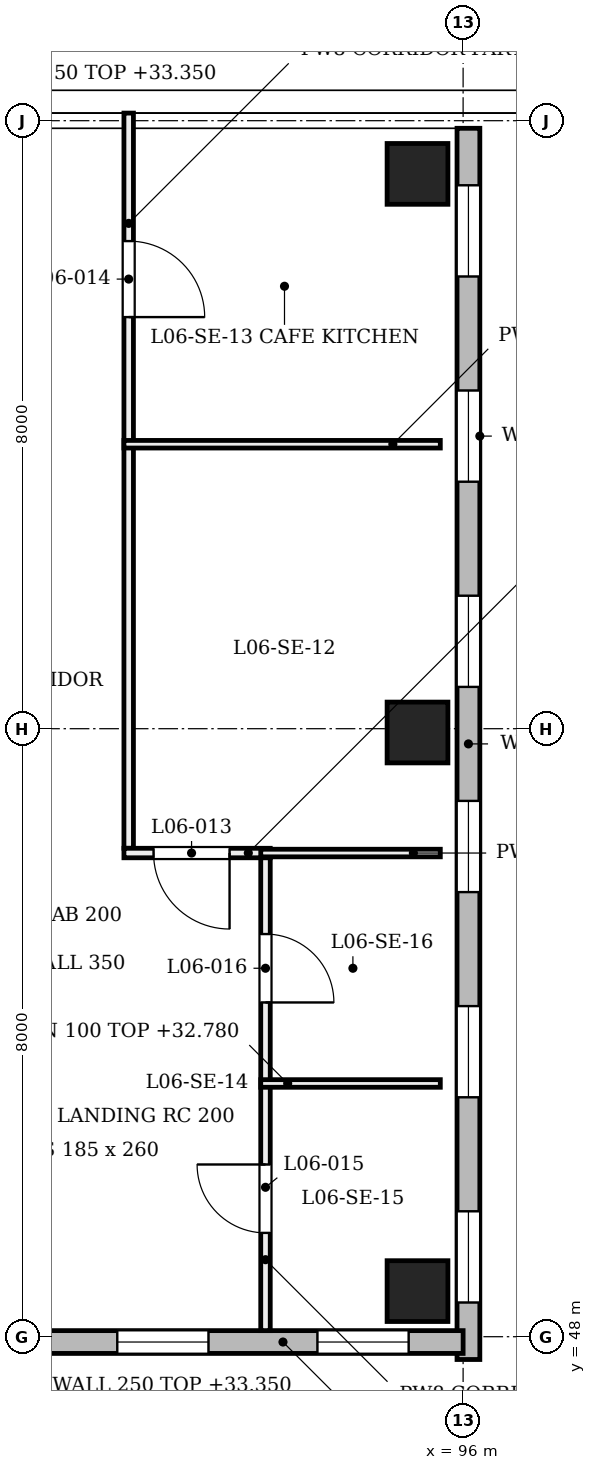
"""IFC4 building model, lengths in metres.
Left out: names, types, materials, properties, quantities, classifications, styles, units other than length and angle.
Written with IfcOpenShell. Run it as: python <this file> out.ifc"""

import sys

from ifc_helpers import new_model, si_unit, direction, frame, frame_2d, origin, origin_2d, place, context, subcontext, project, spatial, rectangle, extrude, element, fill, save


model = new_model("IFC4")
c1 = context("Model", 3, precision=1e-05, world=origin(), true_north=direction((0.0, 1.0)))
c2 = subcontext(c1, "Body", "Model", "MODEL_VIEW")
j1 = project(units=[si_unit("LENGTHUNIT", "METRE"), si_unit("PLANEANGLEUNIT", "RADIAN")], contexts=[c1])
p1 = place(None, origin())
s1 = spatial("IfcSite", under=j1, at=p1, CompositionType="ELEMENT")
p2 = place(p1, origin())
s2 = spatial("IfcBuilding", under=s1, at=p2, CompositionType="ELEMENT")
p3 = place(p2, frame((0.0, 0.0, 28.8)))
s3 = spatial("IfcBuildingStorey", under=s2, at=p3, CompositionType="ELEMENT", Elevation=28.8)
for number, where, z_axis, x_axis in (
    (1, (95.4, 48.6, 0.0), (0.0, 0.0, 1.0), (1.0, 0.0, 0.0)),
    (2, (95.4, 55.95, 0.0), (0.0, 0.0, 1.0), (1.0, 0.0, 0.0)),
    (3, (95.4, 63.3, 0.0), (0.0, 0.0, 1.0), (1.0, 0.0, 0.0)),
):
    element("IfcColumn", number, at=place(p3, frame(where, z_axis=z_axis, x_axis=x_axis)), inside=s3, PredefinedType="COLUMN", context=c2, shape_type="SweptSolid", body=[
        extrude(rectangle(XDim=0.8, YDim=0.8, at=origin_2d()), origin(), (0.0, 0.0, 1.0), 4.58),
    ])
p4 = place(p3, frame((96.07, 47.7, 0.0), z_axis=(0.0, 0.0, 1.0), x_axis=(0.0, 1.0, 0.0)))
e4 = element("IfcWall", 4, at=p4, inside=s3, PredefinedType="SOLIDWALL", context=c2, shape_type="SweptSolid", body=[
    extrude(rectangle(XDim=16.2, YDim=0.3, at=frame_2d((8.1, 0.0))), origin(), (0.0, 0.0, 1.0), 3.9),
])
p5 = place(p4, frame((0.75, 0.0, 1.0)))
e5 = element("IfcOpeningElement", 5, at=p5, cuts=e4, PredefinedType="OPENING", context=c2, shape_type="SweptSolid", body=[
    extrude(rectangle(XDim=1.2, YDim=2.4, at=frame_2d((0.6, 1.2))), frame((0.0, 0.16, 0.0), z_axis=(0.0, -1.0, 0.0), x_axis=(1.0, 0.0, 0.0)), (0.0, 0.0, 1.0), 0.32),
])
p6 = place(p4, frame((3.45, 0.0, 1.0)))
e6 = element("IfcOpeningElement", 6, at=p6, cuts=e4, PredefinedType="OPENING", context=c2, shape_type="SweptSolid", body=[
    extrude(rectangle(XDim=1.2, YDim=2.4, at=frame_2d((0.6, 1.2))), frame((0.0, 0.16, 0.0), z_axis=(0.0, -1.0, 0.0), x_axis=(1.0, 0.0, 0.0)), (0.0, 0.0, 1.0), 0.32),
])
p7 = place(p4, frame((6.15, 0.0, 1.0)))
e7 = element("IfcOpeningElement", 7, at=p7, cuts=e4, PredefinedType="OPENING", context=c2, shape_type="SweptSolid", body=[
    extrude(rectangle(XDim=1.2, YDim=2.4, at=frame_2d((0.6, 1.2))), frame((0.0, 0.16, 0.0), z_axis=(0.0, -1.0, 0.0), x_axis=(1.0, 0.0, 0.0)), (0.0, 0.0, 1.0), 0.32),
])
p8 = place(p4, frame((8.85, 0.0, 1.0)))
e8 = element("IfcOpeningElement", 8, at=p8, cuts=e4, PredefinedType="OPENING", context=c2, shape_type="SweptSolid", body=[
    extrude(rectangle(XDim=1.2, YDim=2.4, at=frame_2d((0.6, 1.2))), frame((0.0, 0.16, 0.0), z_axis=(0.0, -1.0, 0.0), x_axis=(1.0, 0.0, 0.0)), (0.0, 0.0, 1.0), 0.32),
])
p9 = place(p4, frame((11.55, 0.0, 1.0)))
e9 = element("IfcOpeningElement", 9, at=p9, cuts=e4, PredefinedType="OPENING", context=c2, shape_type="SweptSolid", body=[
    extrude(rectangle(XDim=1.2, YDim=2.4, at=frame_2d((0.6, 1.2))), frame((0.0, 0.16, 0.0), z_axis=(0.0, -1.0, 0.0), x_axis=(1.0, 0.0, 0.0)), (0.0, 0.0, 1.0), 0.32),
])
p10 = place(p4, frame((14.25, 0.0, 1.0)))
e10 = element("IfcOpeningElement", 10, at=p10, cuts=e4, PredefinedType="OPENING", context=c2, shape_type="SweptSolid", body=[
    extrude(rectangle(XDim=1.2, YDim=2.4, at=frame_2d((0.6, 1.2))), frame((0.0, 0.16, 0.0), z_axis=(0.0, -1.0, 0.0), x_axis=(1.0, 0.0, 0.0)), (0.0, 0.0, 1.0), 0.32),
])
p11 = place(p3, frame((88.1, 47.93, 0.0), z_axis=(0.0, 0.0, 1.0), x_axis=(1.0, 0.0, 0.0)))
e11 = element("IfcWall", 11, at=p11, inside=s3, PredefinedType="SOLIDWALL", context=c2, shape_type="SweptSolid", body=[
    extrude(rectangle(XDim=7.9, YDim=0.3, at=frame_2d((3.95, 0.0))), origin(), (0.0, 0.0, 1.0), 3.9),
])
p12 = place(p11, frame((0.717, 0.0, 1.0)))
e12 = element("IfcOpeningElement", 12, at=p12, cuts=e11, PredefinedType="OPENING", context=c2, shape_type="SweptSolid", body=[
    extrude(rectangle(XDim=1.2, YDim=2.4, at=frame_2d((0.6, 1.2))), frame((0.0, 0.16, 0.0), z_axis=(0.0, -1.0, 0.0), x_axis=(1.0, 0.0, 0.0)), (0.0, 0.0, 1.0), 0.32),
])
p13 = place(p11, frame((3.35, 0.0, 1.0)))
e13 = element("IfcOpeningElement", 13, at=p13, cuts=e11, PredefinedType="OPENING", context=c2, shape_type="SweptSolid", body=[
    extrude(rectangle(XDim=1.2, YDim=2.4, at=frame_2d((0.6, 1.2))), frame((0.0, 0.16, 0.0), z_axis=(0.0, -1.0, 0.0), x_axis=(1.0, 0.0, 0.0)), (0.0, 0.0, 1.0), 0.32),
])
p14 = place(p11, frame((5.983, 0.0, 1.0)))
e14 = element("IfcOpeningElement", 14, at=p14, cuts=e11, PredefinedType="OPENING", context=c2, shape_type="SweptSolid", body=[
    extrude(rectangle(XDim=1.2, YDim=2.4, at=frame_2d((0.6, 1.2))), frame((0.0, 0.16, 0.0), z_axis=(0.0, -1.0, 0.0), x_axis=(1.0, 0.0, 0.0)), (0.0, 0.0, 1.0), 0.32),
])
p15 = place(p3, frame((85.3, 64.25, 0.0), z_axis=(0.0, 0.0, 1.0), x_axis=(1.0, 0.0, 0.0)))
e15 = element("IfcWall", 15, at=p15, inside=s3, PredefinedType="PARAPET", context=c2, shape_type="SweptSolid", body=[
    extrude(rectangle(XDim=15.4, YDim=0.3, at=frame_2d((7.7, 0.0))), origin(), (0.0, 0.0, 1.0), 1.1),
])
p16 = place(p3, frame((91.6, 54.427, 0.0), z_axis=(0.0, 0.0, 1.0), x_axis=(0.0, 1.0, 0.0)))
e16 = element("IfcWall", 16, at=p16, inside=s3, PredefinedType="PARTITIONING", context=c2, shape_type="SweptSolid", body=[
    extrude(rectangle(XDim=9.674, YDim=0.125, at=frame_2d((4.837, 0.0))), origin(), (0.0, 0.0, 1.0), 3.88),
])
p17 = place(p16, frame((6.99, 0.0, 0.0)))
e17 = element("IfcOpeningElement", 17, at=p17, cuts=e16, PredefinedType="OPENING", context=c2, shape_type="SweptSolid", body=[
    extrude(rectangle(XDim=1.0, YDim=2.1, at=frame_2d((0.5, 1.05))), frame((0.0, 0.073, 0.0), z_axis=(0.0, -1.0, 0.0), x_axis=(1.0, 0.0, 0.0)), (0.0, 0.0, 1.0), 0.145),
])
p18 = place(p3, frame((91.538, 54.364, 0.0), z_axis=(0.0, 0.0, 1.0), x_axis=(1.0, 0.0, 0.0)))
e18 = element("IfcWall", 18, at=p18, inside=s3, PredefinedType="PARTITIONING", context=c2, shape_type="SweptSolid", body=[
    extrude(rectangle(XDim=1.925, YDim=0.125, at=frame_2d((0.962, 0.0))), origin(), (0.0, 0.0, 1.0), 4.56),
])
p19 = place(p18, frame((0.39, 0.0, 0.0)))
e19 = element("IfcOpeningElement", 19, at=p19, cuts=e18, PredefinedType="OPENING", context=c2, shape_type="SweptSolid", body=[
    extrude(rectangle(XDim=1.0, YDim=2.1, at=frame_2d((0.5, 1.05))), frame((0.0, 0.073, 0.0), z_axis=(0.0, -1.0, 0.0), x_axis=(1.0, 0.0, 0.0)), (0.0, 0.0, 1.0), 0.145),
])
p20 = place(p3, frame((93.337, 54.364, 0.0), z_axis=(0.0, 0.0, 1.0), x_axis=(1.0, 0.0, 0.0)))
e20 = element("IfcWall", 20, at=p20, inside=s3, PredefinedType="PARTITIONING", context=c2, shape_type="SweptSolid", body=[
    extrude(rectangle(XDim=2.363, YDim=0.1, at=frame_2d((1.181, 0.0))), origin(), (0.0, 0.0, 1.0), 3.98),
])
p21 = place(p3, frame((91.538, 59.743, 0.0), z_axis=(0.0, 0.0, 1.0), x_axis=(1.0, 0.0, 0.0)))
e21 = element("IfcWall", 21, at=p21, inside=s3, PredefinedType="PARTITIONING", context=c2, shape_type="SweptSolid", body=[
    extrude(rectangle(XDim=4.162, YDim=0.1, at=frame_2d((2.081, 0.0))), origin(), (0.0, 0.0, 1.0), 3.98),
])
p22 = place(p3, frame((93.4, 48.08, 0.0), z_axis=(0.0, 0.0, 1.0), x_axis=(0.0, 1.0, 0.0)))
e22 = element("IfcWall", 22, at=p22, inside=s3, PredefinedType="PARTITIONING", context=c2, shape_type="SweptSolid", body=[
    extrude(rectangle(XDim=6.221, YDim=0.125, at=frame_2d((3.111, 0.0))), origin(), (0.0, 0.0, 1.0), 3.88),
])
p23 = place(p22, frame((1.286, 0.0, 0.0)))
e23 = element("IfcOpeningElement", 23, at=p23, cuts=e22, PredefinedType="OPENING", context=c2, shape_type="SweptSolid", body=[
    extrude(rectangle(XDim=0.9, YDim=2.1, at=frame_2d((0.45, 1.05))), frame((0.0, 0.073, 0.0), z_axis=(0.0, -1.0, 0.0), x_axis=(1.0, 0.0, 0.0)), (0.0, 0.0, 1.0), 0.145),
])
p24 = place(p22, frame((4.318, 0.0, 0.0)))
e24 = element("IfcOpeningElement", 24, at=p24, cuts=e22, PredefinedType="OPENING", context=c2, shape_type="SweptSolid", body=[
    extrude(rectangle(XDim=0.9, YDim=2.1, at=frame_2d((0.45, 1.05))), frame((0.0, 0.073, 0.0), z_axis=(0.0, -1.0, 0.0), x_axis=(1.0, 0.0, 0.0)), (0.0, 0.0, 1.0), 0.145),
])
p25 = place(p3, frame((93.337, 51.332, 0.0), z_axis=(0.0, 0.0, 1.0), x_axis=(1.0, 0.0, 0.0)))
e25 = element("IfcWall", 25, at=p25, inside=s3, PredefinedType="PARTITIONING", context=c2, shape_type="SweptSolid", body=[
    extrude(rectangle(XDim=2.363, YDim=0.1, at=frame_2d((1.181, 0.0))), origin(), (0.0, 0.0, 1.0), 3.98),
])
p26 = place(p5, origin())
e26 = element("IfcWindow", 26, at=p26, inside=s3, PartitioningType="SINGLE_PANEL", PredefinedType="WINDOW", context=c2, shape_type="SweptSolid", body=[
    extrude(rectangle(XDim=1.2, YDim=2.4, at=frame_2d((0.6, 1.2))), frame((0.0, 0.03, 0.0), z_axis=(0.0, -1.0, 0.0), x_axis=(1.0, 0.0, 0.0)), (0.0, 0.0, 1.0), 0.06),
])
fill(e5, e26)
p27 = place(p6, origin())
e27 = element("IfcWindow", 27, at=p27, inside=s3, PartitioningType="SINGLE_PANEL", PredefinedType="WINDOW", context=c2, shape_type="SweptSolid", body=[
    extrude(rectangle(XDim=1.2, YDim=2.4, at=frame_2d((0.6, 1.2))), frame((0.0, 0.03, 0.0), z_axis=(0.0, -1.0, 0.0), x_axis=(1.0, 0.0, 0.0)), (0.0, 0.0, 1.0), 0.06),
])
fill(e6, e27)
p28 = place(p7, origin())
e28 = element("IfcWindow", 28, at=p28, inside=s3, PartitioningType="SINGLE_PANEL", PredefinedType="WINDOW", context=c2, shape_type="SweptSolid", body=[
    extrude(rectangle(XDim=1.2, YDim=2.4, at=frame_2d((0.6, 1.2))), frame((0.0, 0.03, 0.0), z_axis=(0.0, -1.0, 0.0), x_axis=(1.0, 0.0, 0.0)), (0.0, 0.0, 1.0), 0.06),
])
fill(e7, e28)
p29 = place(p8, origin())
e29 = element("IfcWindow", 29, at=p29, inside=s3, PartitioningType="SINGLE_PANEL", PredefinedType="WINDOW", context=c2, shape_type="SweptSolid", body=[
    extrude(rectangle(XDim=1.2, YDim=2.4, at=frame_2d((0.6, 1.2))), frame((0.0, 0.03, 0.0), z_axis=(0.0, -1.0, 0.0), x_axis=(1.0, 0.0, 0.0)), (0.0, 0.0, 1.0), 0.06),
])
fill(e8, e29)
p30 = place(p9, origin())
e30 = element("IfcWindow", 30, at=p30, inside=s3, PartitioningType="SINGLE_PANEL", PredefinedType="WINDOW", context=c2, shape_type="SweptSolid", body=[
    extrude(rectangle(XDim=1.2, YDim=2.4, at=frame_2d((0.6, 1.2))), frame((0.0, 0.03, 0.0), z_axis=(0.0, -1.0, 0.0), x_axis=(1.0, 0.0, 0.0)), (0.0, 0.0, 1.0), 0.06),
])
fill(e9, e30)
p31 = place(p10, origin())
e31 = element("IfcWindow", 31, at=p31, inside=s3, PartitioningType="SINGLE_PANEL", PredefinedType="WINDOW", context=c2, shape_type="SweptSolid", body=[
    extrude(rectangle(XDim=1.2, YDim=2.4, at=frame_2d((0.6, 1.2))), frame((0.0, 0.03, 0.0), z_axis=(0.0, -1.0, 0.0), x_axis=(1.0, 0.0, 0.0)), (0.0, 0.0, 1.0), 0.06),
])
fill(e10, e31)
p32 = place(p13, origin())
e32 = element("IfcWindow", 32, at=p32, inside=s3, PartitioningType="SINGLE_PANEL", PredefinedType="WINDOW", context=c2, shape_type="SweptSolid", body=[
    extrude(rectangle(XDim=1.2, YDim=2.4, at=frame_2d((0.6, 1.2))), frame((0.0, 0.03, 0.0), z_axis=(0.0, -1.0, 0.0), x_axis=(1.0, 0.0, 0.0)), (0.0, 0.0, 1.0), 0.06),
])
fill(e13, e32)
p33 = place(p14, origin())
e33 = element("IfcWindow", 33, at=p33, inside=s3, PartitioningType="SINGLE_PANEL", PredefinedType="WINDOW", context=c2, shape_type="SweptSolid", body=[
    extrude(rectangle(XDim=1.2, YDim=2.4, at=frame_2d((0.6, 1.2))), frame((0.0, 0.03, 0.0), z_axis=(0.0, -1.0, 0.0), x_axis=(1.0, 0.0, 0.0)), (0.0, 0.0, 1.0), 0.06),
])
fill(e14, e33)
p34 = place(p19, origin())
e34 = element("IfcDoor", 34, at=p34, inside=s3, OperationType="SINGLE_SWING_RIGHT", PredefinedType="DOOR", context=c2, shape_type="SweptSolid", body=[
    extrude(rectangle(XDim=1.0, YDim=2.1, at=frame_2d((0.5, 1.05))), frame((0.0, 0.025, 0.0), z_axis=(0.0, -1.0, 0.0), x_axis=(1.0, 0.0, 0.0)), (0.0, 0.0, 1.0), 0.05),
])
fill(e19, e34)
p35 = place(p17, frame((1.0, 0.0, 0.0), z_axis=(0.0, 0.0, 1.0), x_axis=(-1.0, 0.0, 0.0)))
e35 = element("IfcDoor", 35, at=p35, inside=s3, OperationType="SINGLE_SWING_LEFT", PredefinedType="DOOR", context=c2, shape_type="SweptSolid", body=[
    extrude(rectangle(XDim=1.0, YDim=2.1, at=frame_2d((0.5, 1.05))), frame((0.0, 0.025, 0.0), z_axis=(0.0, -1.0, 0.0), x_axis=(1.0, 0.0, 0.0)), (0.0, 0.0, 1.0), 0.05),
])
fill(e17, e35)
p36 = place(p23, frame((0.9, 0.0, 0.0), z_axis=(0.0, 0.0, 1.0), x_axis=(-1.0, 0.0, 0.0)))
e36 = element("IfcDoor", 36, at=p36, inside=s3, OperationType="SINGLE_SWING_RIGHT", PredefinedType="DOOR", context=c2, shape_type="SweptSolid", body=[
    extrude(rectangle(XDim=0.9, YDim=2.1, at=frame_2d((0.45, 1.05))), frame((0.0, 0.025, 0.0), z_axis=(0.0, -1.0, 0.0), x_axis=(1.0, 0.0, 0.0)), (0.0, 0.0, 1.0), 0.05),
])
fill(e23, e36)
p37 = place(p24, frame((0.9, 0.0, 0.0), z_axis=(0.0, 0.0, 1.0), x_axis=(-1.0, 0.0, 0.0)))
e37 = element("IfcDoor", 37, at=p37, inside=s3, OperationType="SINGLE_SWING_LEFT", PredefinedType="DOOR", context=c2, shape_type="SweptSolid", body=[
    extrude(rectangle(XDim=0.9, YDim=2.1, at=frame_2d((0.45, 1.05))), frame((0.0, 0.025, 0.0), z_axis=(0.0, -1.0, 0.0), x_axis=(1.0, 0.0, 0.0)), (0.0, 0.0, 1.0), 0.05),
])
fill(e24, e37)
save(model, sys.argv[1])
